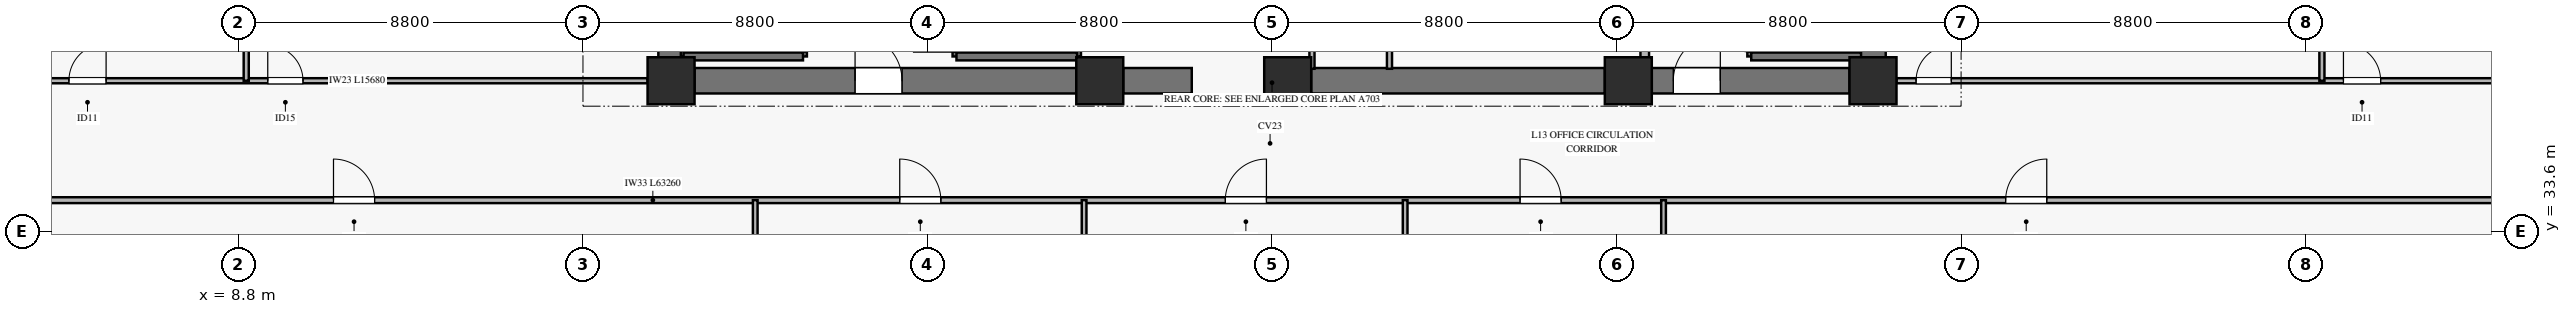
"""IFC4 building model, lengths in metres.
Left out: names, types, materials, properties, quantities, classifications, styles, units other than length and angle.
Written with IfcOpenShell. Run it as: python <this file> out.ifc"""

import sys

from ifc_helpers import new_model, si_unit, direction, frame, frame_2d, origin, origin_2d, place, context, subcontext, project, spatial, rectangle, extrude, source, transform, mapped, element, fill, save


model = new_model("IFC4")
c1 = context("Model", 3, precision=1e-05, world=origin(), true_north=direction((0.0, 1.0)))
c2 = subcontext(c1, "Body", "Model", "MODEL_VIEW")
j1 = project(units=[si_unit("LENGTHUNIT", "METRE"), si_unit("PLANEANGLEUNIT", "RADIAN")], contexts=[c1])
p1 = place(None, origin())
s1 = spatial("IfcSite", under=j1, at=p1, CompositionType="ELEMENT")
p2 = place(p1, origin())
s2 = spatial("IfcBuilding", under=s1, at=p2, CompositionType="ELEMENT")
p3 = place(p2, frame((0.0, 0.0, 53.3)))
s3 = spatial("IfcBuildingStorey", under=s2, at=p3, CompositionType="ELEMENT", Elevation=53.3)
m1 = source(origin(), c2, "Body", "SweptSolid", [
    extrude(rectangle(XDim=1.2, YDim=1.2, at=origin_2d()), origin(), (0.0, 0.0, 1.0), 3.68),
])
for number, where, z_axis, x_axis in (
    (1, (19.85, 37.45, 0.0), (0.0, 0.0, 1.0), (1.0, 0.0, 0.0)),
    (2, (30.8, 37.45, 0.0), (0.0, 0.0, 1.0), (1.0, 0.0, 0.0)),
    (3, (35.6, 37.45, 0.0), (0.0, 0.0, 1.0), (1.0, 0.0, 0.0)),
    (4, (44.3, 37.45, 0.0), (0.0, 0.0, 1.0), (1.0, 0.0, 0.0)),
    (5, (50.55, 37.45, 0.0), (0.0, 0.0, 1.0), (1.0, 0.0, 0.0)),
):
    element("IfcColumn", number, at=place(p3, frame(where, z_axis=z_axis, x_axis=x_axis)), inside=s3, PredefinedType="PILASTER", context=c2, shape_type="MappedRepresentation", body=[
        mapped(m1, transform((0.0, 0.0, 0.0), x_axis=(1.0, 0.0, 0.0), y_axis=(0.0, 1.0, 0.0), z_axis=(0.0, 0.0, 1.0), scale=1.0)),
    ])
p4 = place(p3, frame((20.45, 37.45, 0.0), z_axis=(0.0, 0.0, 1.0), x_axis=(1.0, 0.0, 0.0)))
e6 = element("IfcWall", 6, at=p4, inside=s3, PredefinedType="SHEAR", context=c2, shape_type="SweptSolid", body=[
    extrude(rectangle(XDim=9.75, YDim=0.65, at=frame_2d((4.875, 0.0))), origin(), (0.0, 0.0, 1.0), 3.68),
])
p5 = place(p4, frame((4.1, 0.0, 0.0)))
e7 = element("IfcOpeningElement", 7, at=p5, cuts=e6, PredefinedType="OPENING", context=c2, shape_type="SweptSolid", body=[
    extrude(rectangle(XDim=1.2, YDim=2.15, at=frame_2d((0.6, 1.075))), frame((0.0, 0.335, 0.0), z_axis=(0.0, -1.0, 0.0), x_axis=(1.0, 0.0, 0.0)), (0.0, 0.0, 1.0), 0.67),
])
p6 = place(p3, frame((31.4, 37.45, 0.0), z_axis=(0.0, 0.0, 1.0), x_axis=(1.0, 0.0, 0.0)))
e8 = element("IfcWall", 8, at=p6, inside=s3, PredefinedType="SHEAR", context=c2, shape_type="SweptSolid", body=[
    extrude(rectangle(XDim=1.75, YDim=0.65, at=frame_2d((0.875, 0.0))), origin(), (0.0, 0.0, 1.0), 3.68),
])
p7 = place(p3, frame((36.2, 37.45, 0.0), z_axis=(0.0, 0.0, 1.0), x_axis=(1.0, 0.0, 0.0)))
e9 = element("IfcWall", 9, at=p7, inside=s3, PredefinedType="SHEAR", context=c2, shape_type="SweptSolid", body=[
    extrude(rectangle(XDim=7.5, YDim=0.65, at=frame_2d((3.75, 0.0))), origin(), (0.0, 0.0, 1.0), 3.68),
])
p8 = place(p3, frame((44.9, 37.45, 0.0), z_axis=(0.0, 0.0, 1.0), x_axis=(1.0, 0.0, 0.0)))
e10 = element("IfcWall", 10, at=p8, inside=s3, PredefinedType="SHEAR", context=c2, shape_type="SweptSolid", body=[
    extrude(rectangle(XDim=5.05, YDim=0.65, at=frame_2d((2.525, 0.0))), origin(), (0.0, 0.0, 1.0), 3.68),
])
p9 = place(p8, frame((0.55, 0.0, 0.0)))
e11 = element("IfcOpeningElement", 11, at=p9, cuts=e10, PredefinedType="OPENING", context=c2, shape_type="SweptSolid", body=[
    extrude(rectangle(XDim=1.2, YDim=2.15, at=frame_2d((0.6, 1.075))), frame((0.0, 0.335, 0.0), z_axis=(0.0, -1.0, 0.0), x_axis=(1.0, 0.0, 0.0)), (0.0, 0.0, 1.0), 0.67),
])
for number, where, z_axis, x_axis in (
    (12, (19.85, 38.05, 0.0), (0.0, 0.0, 1.0), (0.0, 1.0, 0.0)),
    (13, (50.55, 38.05, 0.0), (0.0, 0.0, 1.0), (0.0, 1.0, 0.0)),
):
    element("IfcWall", number, at=place(p3, frame(where, z_axis=z_axis, x_axis=x_axis)), inside=s3, PredefinedType="SHEAR", context=c2, shape_type="SweptSolid", body=[
        extrude(rectangle(XDim=7.9, YDim=0.65, at=frame_2d((3.95, 0.0))), origin(), (0.0, 0.0, 1.0), 3.68),
    ])
p10 = place(p3, frame((20.17, 38.07, 0.0), z_axis=(0.0, 0.0, 1.0), x_axis=(0.0, 1.0, 0.0)))
e14 = element("IfcWall", 14, at=p10, inside=s3, PredefinedType="SOLIDWALL", context=c2, shape_type="SweptSolid", body=[
    extrude(rectangle(XDim=7.25, YDim=0.14, at=frame_2d((3.625, 0.0))), origin(), (0.0, 0.0, 1.0), 3.9),
])
p11 = place(p3, frame((23.22, 38.07, 0.0), z_axis=(0.0, 0.0, 1.0), x_axis=(0.0, 1.0, 0.0)))
e15 = element("IfcWall", 15, at=p11, inside=s3, PredefinedType="SOLIDWALL", context=c2, shape_type="SweptSolid", body=[
    extrude(rectangle(XDim=7.25, YDim=0.2, at=frame_2d((3.625, 0.0))), origin(), (0.0, 0.0, 1.0), 3.9),
])
p12 = place(p11, frame((0.11, 0.0, 0.0)))
e16 = element("IfcOpeningElement", 16, at=p12, cuts=e15, PredefinedType="OPENING", context=c2, shape_type="SweptSolid", body=[
    extrude(rectangle(XDim=1.1, YDim=2.15, at=frame_2d((0.55, 1.075))), frame((0.0, 0.11, 0.0), z_axis=(0.0, -1.0, 0.0), x_axis=(1.0, 0.0, 0.0)), (0.0, 0.0, 1.0), 0.22),
])
p13 = place(p3, frame((20.17, 38.07, 0.0), z_axis=(0.0, 0.0, 1.0), x_axis=(1.0, 0.0, 0.0)))
e17 = element("IfcWall", 17, at=p13, inside=s3, PredefinedType="SOLIDWALL", context=c2, shape_type="SweptSolid", body=[
    extrude(rectangle(XDim=3.05, YDim=0.2, at=frame_2d((1.525, 0.0))), origin(), (0.0, 0.0, 1.0), 3.9),
])
p14 = place(p3, frame((27.14, 38.07, 0.0), z_axis=(0.0, 0.0, 1.0), x_axis=(0.0, 1.0, 0.0)))
e18 = element("IfcWall", 18, at=p14, inside=s3, PredefinedType="SOLIDWALL", context=c2, shape_type="SweptSolid", body=[
    extrude(rectangle(XDim=7.25, YDim=0.2, at=frame_2d((3.625, 0.0))), origin(), (0.0, 0.0, 1.0), 3.9),
])
p15 = place(p14, frame((0.11, 0.0, 0.0)))
e19 = element("IfcOpeningElement", 19, at=p15, cuts=e18, PredefinedType="OPENING", context=c2, shape_type="SweptSolid", body=[
    extrude(rectangle(XDim=1.1, YDim=2.15, at=frame_2d((0.55, 1.075))), frame((0.0, 0.11, 0.0), z_axis=(0.0, -1.0, 0.0), x_axis=(1.0, 0.0, 0.0)), (0.0, 0.0, 1.0), 0.22),
])
p16 = place(p3, frame((30.22, 38.07, 0.0), z_axis=(0.0, 0.0, 1.0), x_axis=(0.0, 1.0, 0.0)))
e20 = element("IfcWall", 20, at=p16, inside=s3, PredefinedType="SOLIDWALL", context=c2, shape_type="SweptSolid", body=[
    extrude(rectangle(XDim=7.25, YDim=0.2, at=frame_2d((3.625, 0.0))), origin(), (0.0, 0.0, 1.0), 3.9),
])
p17 = place(p3, frame((27.14, 38.07, 0.0), z_axis=(0.0, 0.0, 1.0), x_axis=(1.0, 0.0, 0.0)))
e21 = element("IfcWall", 21, at=p17, inside=s3, PredefinedType="SOLIDWALL", context=c2, shape_type="SweptSolid", body=[
    extrude(rectangle(XDim=3.08, YDim=0.2, at=frame_2d((1.54, 0.0))), origin(), (0.0, 0.0, 1.0), 3.9),
])
p18 = place(p3, frame((47.44, 38.07, 0.0), z_axis=(0.0, 0.0, 1.0), x_axis=(0.0, 1.0, 0.0)))
e22 = element("IfcWall", 22, at=p18, inside=s3, PredefinedType="SOLIDWALL", context=c2, shape_type="SweptSolid", body=[
    extrude(rectangle(XDim=7.25, YDim=0.2, at=frame_2d((3.625, 0.0))), origin(), (0.0, 0.0, 1.0), 3.9),
])
p19 = place(p18, frame((0.11, 0.0, 0.0)))
e23 = element("IfcOpeningElement", 23, at=p19, cuts=e22, PredefinedType="OPENING", context=c2, shape_type="SweptSolid", body=[
    extrude(rectangle(XDim=1.1, YDim=2.15, at=frame_2d((0.55, 1.075))), frame((0.0, 0.11, 0.0), z_axis=(0.0, -1.0, 0.0), x_axis=(1.0, 0.0, 0.0)), (0.0, 0.0, 1.0), 0.22),
])
p20 = place(p3, frame((47.44, 38.07, 0.0), z_axis=(0.0, 0.0, 1.0), x_axis=(1.0, 0.0, 0.0)))
e24 = element("IfcWall", 24, at=p20, inside=s3, PredefinedType="SOLIDWALL", context=c2, shape_type="SweptSolid", body=[
    extrude(rectangle(XDim=2.805, YDim=0.2, at=frame_2d((1.403, 0.0))), origin(), (0.0, 0.0, 1.0), 3.9),
])
p21 = place(p3, frame((44.72, 37.755, 0.0), z_axis=(0.0, 0.0, 1.0), x_axis=(0.0, 1.0, 0.0)))
e25 = element("IfcWall", 25, at=p21, inside=s3, PredefinedType="SOLIDWALL", context=c2, shape_type="SweptSolid", body=[
    extrude(rectangle(XDim=7.465, YDim=0.22, at=frame_2d((3.732, 0.0))), origin(), (0.0, 0.0, 1.0), 3.68),
])
p22 = place(p3, frame((36.22, 37.755, 0.0), z_axis=(0.0, 0.0, 1.0), x_axis=(0.0, 1.0, 0.0)))
e26 = element("IfcWall", 26, at=p22, inside=s3, PredefinedType="PARTITIONING", context=c2, shape_type="SweptSolid", body=[
    extrude(rectangle(XDim=2.165, YDim=0.13, at=frame_2d((1.083, 0.0))), origin(), (0.0, 0.0, 1.0), 3.68),
])
p23 = place(p22, frame((0.855, 0.0, 0.0)))
e27 = element("IfcOpeningElement", 27, at=p23, cuts=e26, PredefinedType="OPENING", context=c2, shape_type="SweptSolid", body=[
    extrude(rectangle(XDim=0.9, YDim=2.1, at=frame_2d((0.45, 1.05))), frame((0.0, 0.075, 0.0), z_axis=(0.0, -1.0, 0.0), x_axis=(1.0, 0.0, 0.0)), (0.0, 0.0, 1.0), 0.15),
])
p24 = place(p3, frame((38.2, 37.755, 0.0), z_axis=(0.0, 0.0, 1.0), x_axis=(0.0, 1.0, 0.0)))
e28 = element("IfcWall", 28, at=p24, inside=s3, PredefinedType="PARTITIONING", context=c2, shape_type="SweptSolid", body=[
    extrude(rectangle(XDim=2.165, YDim=0.13, at=frame_2d((1.083, 0.0))), origin(), (0.0, 0.0, 1.0), 3.68),
])
p25 = place(p24, frame((0.565, 0.0, 0.0)))
e29 = element("IfcOpeningElement", 29, at=p25, cuts=e28, PredefinedType="OPENING", context=c2, shape_type="SweptSolid", body=[
    extrude(rectangle(XDim=0.9, YDim=2.1, at=frame_2d((0.45, 1.05))), frame((0.0, 0.075, 0.0), z_axis=(0.0, -1.0, 0.0), x_axis=(1.0, 0.0, 0.0)), (0.0, 0.0, 1.0), 0.15),
])
p26 = place(p3, frame((3.57, 34.4, 0.0), z_axis=(0.0, 0.0, 1.0), x_axis=(1.0, 0.0, 0.0)))
e30 = element("IfcWall", 30, at=p26, inside=s3, PredefinedType="PARTITIONING", context=c2, shape_type="SweptSolid", body=[
    extrude(rectangle(XDim=63.26, YDim=0.15, at=frame_2d((31.63, 0.0))), origin(), (0.0, 0.0, 1.0), 2.765),
])
p27 = place(p26, frame((7.658, 0.0, 0.0)))
e31 = element("IfcOpeningElement", 31, at=p27, cuts=e30, PredefinedType="OPENING", context=c2, shape_type="SweptSolid", body=[
    extrude(rectangle(XDim=1.05, YDim=2.15, at=frame_2d((0.525, 1.075))), frame((0.0, 0.085, 0.0), z_axis=(0.0, -1.0, 0.0), x_axis=(1.0, 0.0, 0.0)), (0.0, 0.0, 1.0), 0.17),
])
p28 = place(p26, frame((22.121, 0.0, 0.0)))
e32 = element("IfcOpeningElement", 32, at=p28, cuts=e30, PredefinedType="OPENING", context=c2, shape_type="SweptSolid", body=[
    extrude(rectangle(XDim=1.05, YDim=2.15, at=frame_2d((0.525, 1.075))), frame((0.0, 0.085, 0.0), z_axis=(0.0, -1.0, 0.0), x_axis=(1.0, 0.0, 0.0)), (0.0, 0.0, 1.0), 0.17),
])
p29 = place(p26, frame((30.437, 0.0, 0.0)))
e33 = element("IfcOpeningElement", 33, at=p29, cuts=e30, PredefinedType="OPENING", context=c2, shape_type="SweptSolid", body=[
    extrude(rectangle(XDim=1.05, YDim=2.15, at=frame_2d((0.525, 1.075))), frame((0.0, 0.085, 0.0), z_axis=(0.0, -1.0, 0.0), x_axis=(1.0, 0.0, 0.0)), (0.0, 0.0, 1.0), 0.17),
])
p30 = place(p26, frame((37.965, 0.0, 0.0)))
e34 = element("IfcOpeningElement", 34, at=p30, cuts=e30, PredefinedType="OPENING", context=c2, shape_type="SweptSolid", body=[
    extrude(rectangle(XDim=1.05, YDim=2.15, at=frame_2d((0.525, 1.075))), frame((0.0, 0.085, 0.0), z_axis=(0.0, -1.0, 0.0), x_axis=(1.0, 0.0, 0.0)), (0.0, 0.0, 1.0), 0.17),
])
p31 = place(p26, frame((50.368, 0.0, 0.0)))
e35 = element("IfcOpeningElement", 35, at=p31, cuts=e30, PredefinedType="OPENING", context=c2, shape_type="SweptSolid", body=[
    extrude(rectangle(XDim=1.05, YDim=2.15, at=frame_2d((0.525, 1.075))), frame((0.0, 0.085, 0.0), z_axis=(0.0, -1.0, 0.0), x_axis=(1.0, 0.0, 0.0)), (0.0, 0.0, 1.0), 0.17),
])
p32 = place(p3, frame((22.0, 4.354, 0.0), z_axis=(0.0, 0.0, 1.0), x_axis=(0.0, 1.0, 0.0)))
e36 = element("IfcWall", 36, at=p32, inside=s3, PredefinedType="PARTITIONING", context=c2, shape_type="SweptSolid", body=[
    extrude(rectangle(XDim=30.046, YDim=0.12, at=frame_2d((15.023, 0.0))), origin(), (0.0, 0.0, 1.0), 3.165),
])
p33 = place(p3, frame((30.4, 4.354, 0.0), z_axis=(0.0, 0.0, 1.0), x_axis=(0.0, 1.0, 0.0)))
e37 = element("IfcWall", 37, at=p33, inside=s3, PredefinedType="PARTITIONING", context=c2, shape_type="SweptSolid", body=[
    extrude(rectangle(XDim=30.046, YDim=0.12, at=frame_2d((15.023, 0.0))), origin(), (0.0, 0.0, 1.0), 3.215),
])
for number, where, z_axis, x_axis in (
    (38, (38.6, 4.354, 0.0), (0.0, 0.0, 1.0), (0.0, 1.0, 0.0)),
    (39, (45.2, 4.354, 0.0), (0.0, 0.0, 1.0), (0.0, 1.0, 0.0)),
):
    element("IfcWall", number, at=place(p3, frame(where, z_axis=z_axis, x_axis=x_axis)), inside=s3, PredefinedType="PARTITIONING", context=c2, shape_type="SweptSolid", body=[
        extrude(rectangle(XDim=30.046, YDim=0.12, at=frame_2d((15.023, 0.0))), origin(), (0.0, 0.0, 1.0), 3.165),
    ])
p34 = place(p3, frame((3.57, 37.45, 0.0), z_axis=(0.0, 0.0, 1.0), x_axis=(1.0, 0.0, 0.0)))
e40 = element("IfcWall", 40, at=p34, inside=s3, PredefinedType="PARTITIONING", context=c2, shape_type="SweptSolid", body=[
    extrude(rectangle(XDim=15.68, YDim=0.13, at=frame_2d((7.84, 0.0))), origin(), (0.0, 0.0, 1.0), 3.165),
])
p35 = place(p34, frame((0.9, 0.0, 0.0)))
e41 = element("IfcOpeningElement", 41, at=p35, cuts=e40, PredefinedType="OPENING", context=c2, shape_type="SweptSolid", body=[
    extrude(rectangle(XDim=0.95, YDim=2.1, at=frame_2d((0.475, 1.05))), frame((0.0, 0.075, 0.0), z_axis=(0.0, -1.0, 0.0), x_axis=(1.0, 0.0, 0.0)), (0.0, 0.0, 1.0), 0.15),
])
p36 = place(p34, frame((5.979, 0.0, 0.0)))
e42 = element("IfcOpeningElement", 42, at=p36, cuts=e40, PredefinedType="OPENING", context=c2, shape_type="SweptSolid", body=[
    extrude(rectangle(XDim=0.9, YDim=2.1, at=frame_2d((0.45, 1.05))), frame((0.0, 0.075, 0.0), z_axis=(0.0, -1.0, 0.0), x_axis=(1.0, 0.0, 0.0)), (0.0, 0.0, 1.0), 0.15),
])
p37 = place(p3, frame((8.999, 37.45, 0.0), z_axis=(0.0, 0.0, 1.0), x_axis=(0.0, 1.0, 0.0)))
e43 = element("IfcWall", 43, at=p37, inside=s3, PredefinedType="PARTITIONING", context=c2, shape_type="SweptSolid", body=[
    extrude(rectangle(XDim=8.8, YDim=0.13, at=frame_2d((4.4, 0.0))), origin(), (0.0, 0.0, 1.0), 3.68),
])
p38 = place(p3, frame((51.15, 37.45, 0.0), z_axis=(0.0, 0.0, 1.0), x_axis=(1.0, 0.0, 0.0)))
e44 = element("IfcWall", 44, at=p38, inside=s3, PredefinedType="PARTITIONING", context=c2, shape_type="SweptSolid", body=[
    extrude(rectangle(XDim=15.68, YDim=0.13, at=frame_2d((7.84, 0.0))), origin(), (0.0, 0.0, 1.0), 3.165),
])
p39 = place(p38, frame((0.5, 0.0, 0.0)))
e45 = element("IfcOpeningElement", 45, at=p39, cuts=e44, PredefinedType="OPENING", context=c2, shape_type="SweptSolid", body=[
    extrude(rectangle(XDim=0.9, YDim=2.1, at=frame_2d((0.45, 1.05))), frame((0.0, 0.075, 0.0), z_axis=(0.0, -1.0, 0.0), x_axis=(1.0, 0.0, 0.0)), (0.0, 0.0, 1.0), 0.15),
])
p40 = place(p38, frame((11.416, 0.0, 0.0)))
e46 = element("IfcOpeningElement", 46, at=p40, cuts=e44, PredefinedType="OPENING", context=c2, shape_type="SweptSolid", body=[
    extrude(rectangle(XDim=0.95, YDim=2.1, at=frame_2d((0.475, 1.05))), frame((0.0, 0.075, 0.0), z_axis=(0.0, -1.0, 0.0), x_axis=(1.0, 0.0, 0.0)), (0.0, 0.0, 1.0), 0.15),
])
p41 = place(p3, frame((62.016, 37.45, 0.0), z_axis=(0.0, 0.0, 1.0), x_axis=(0.0, 1.0, 0.0)))
e47 = element("IfcWall", 47, at=p41, inside=s3, PredefinedType="PARTITIONING", context=c2, shape_type="SweptSolid", body=[
    extrude(rectangle(XDim=8.8, YDim=0.13, at=frame_2d((4.4, 0.0))), origin(), (0.0, 0.0, 1.0), 3.68),
])
m2 = source(origin(), c2, "Body", "SweptSolid", [
    extrude(rectangle(XDim=1.2, YDim=2.15, at=frame_2d((0.6, 1.075))), frame((0.0, 0.025, 0.0), z_axis=(0.0, -1.0, 0.0), x_axis=(1.0, 0.0, 0.0)), (0.0, 0.0, 1.0), 0.05),
])
p42 = place(p5, origin())
e48 = element("IfcDoor", 48, at=p42, inside=s3, OperationType="SINGLE_SWING_LEFT", PredefinedType="DOOR", context=c2, shape_type="MappedRepresentation", body=[
    mapped(m2, transform((0.0, 0.0, 0.0), x_axis=(1.0, 0.0, 0.0), y_axis=(0.0, 1.0, 0.0), z_axis=(0.0, 0.0, 1.0), scale=1.0)),
])
fill(e7, e48)
p43 = place(p9, origin())
e49 = element("IfcDoor", 49, at=p43, inside=s3, OperationType="SINGLE_SWING_RIGHT", PredefinedType="DOOR", context=c2, shape_type="MappedRepresentation", body=[
    mapped(m2, transform((0.0, 0.0, 0.0), x_axis=(1.0, 0.0, 0.0), y_axis=(0.0, 1.0, 0.0), z_axis=(0.0, 0.0, 1.0), scale=1.0)),
])
fill(e11, e49)
m3 = source(origin(), c2, "Body", "SweptSolid", [
    extrude(rectangle(XDim=1.05, YDim=2.15, at=frame_2d((0.525, 1.075))), frame((0.0, 0.025, 0.0), z_axis=(0.0, -1.0, 0.0), x_axis=(1.0, 0.0, 0.0)), (0.0, 0.0, 1.0), 0.05),
])
p44 = place(p27, origin())
e50 = element("IfcDoor", 50, at=p44, inside=s3, OperationType="SINGLE_SWING_LEFT", PredefinedType="DOOR", context=c2, shape_type="MappedRepresentation", body=[
    mapped(m3, transform((0.0, 0.0, 0.0), x_axis=(1.0, 0.0, 0.0), y_axis=(0.0, 1.0, 0.0), z_axis=(0.0, 0.0, 1.0), scale=1.0)),
])
fill(e31, e50)
p45 = place(p28, origin())
e51 = element("IfcDoor", 51, at=p45, inside=s3, OperationType="SINGLE_SWING_LEFT", PredefinedType="DOOR", context=c2, shape_type="MappedRepresentation", body=[
    mapped(m3, transform((0.0, 0.0, 0.0), x_axis=(1.0, 0.0, 0.0), y_axis=(0.0, 1.0, 0.0), z_axis=(0.0, 0.0, 1.0), scale=1.0)),
])
fill(e32, e51)
p46 = place(p29, origin())
e52 = element("IfcDoor", 52, at=p46, inside=s3, OperationType="SINGLE_SWING_RIGHT", PredefinedType="DOOR", context=c2, shape_type="MappedRepresentation", body=[
    mapped(m3, transform((0.0, 0.0, 0.0), x_axis=(1.0, 0.0, 0.0), y_axis=(0.0, 1.0, 0.0), z_axis=(0.0, 0.0, 1.0), scale=1.0)),
])
fill(e33, e52)
p47 = place(p30, origin())
e53 = element("IfcDoor", 53, at=p47, inside=s3, OperationType="SINGLE_SWING_LEFT", PredefinedType="DOOR", context=c2, shape_type="MappedRepresentation", body=[
    mapped(m3, transform((0.0, 0.0, 0.0), x_axis=(1.0, 0.0, 0.0), y_axis=(0.0, 1.0, 0.0), z_axis=(0.0, 0.0, 1.0), scale=1.0)),
])
fill(e34, e53)
p48 = place(p31, origin())
e54 = element("IfcDoor", 54, at=p48, inside=s3, OperationType="SINGLE_SWING_RIGHT", PredefinedType="DOOR", context=c2, shape_type="MappedRepresentation", body=[
    mapped(m3, transform((0.0, 0.0, 0.0), x_axis=(1.0, 0.0, 0.0), y_axis=(0.0, 1.0, 0.0), z_axis=(0.0, 0.0, 1.0), scale=1.0)),
])
fill(e35, e54)
m4 = source(origin(), c2, "Body", "SweptSolid", [
    extrude(rectangle(XDim=0.95, YDim=2.1, at=frame_2d((0.475, 1.05))), frame((0.0, 0.025, 0.0), z_axis=(0.0, -1.0, 0.0), x_axis=(1.0, 0.0, 0.0)), (0.0, 0.0, 1.0), 0.05),
])
p49 = place(p35, origin())
e55 = element("IfcDoor", 55, at=p49, inside=s3, OperationType="SINGLE_SWING_RIGHT", PredefinedType="DOOR", context=c2, shape_type="MappedRepresentation", body=[
    mapped(m4, transform((0.0, 0.0, 0.0), x_axis=(1.0, 0.0, 0.0), y_axis=(0.0, 1.0, 0.0), z_axis=(0.0, 0.0, 1.0), scale=1.0)),
])
fill(e41, e55)
m5 = source(origin(), c2, "Body", "SweptSolid", [
    extrude(rectangle(XDim=0.9, YDim=2.1, at=frame_2d((0.45, 1.05))), frame((0.0, 0.025, 0.0), z_axis=(0.0, -1.0, 0.0), x_axis=(1.0, 0.0, 0.0)), (0.0, 0.0, 1.0), 0.05),
])
p50 = place(p36, origin())
e56 = element("IfcDoor", 56, at=p50, inside=s3, OperationType="SINGLE_SWING_LEFT", PredefinedType="DOOR", context=c2, shape_type="MappedRepresentation", body=[
    mapped(m5, transform((0.0, 0.0, 0.0), x_axis=(1.0, 0.0, 0.0), y_axis=(0.0, 1.0, 0.0), z_axis=(0.0, 0.0, 1.0), scale=1.0)),
])
fill(e42, e56)
p51 = place(p39, origin())
e57 = element("IfcDoor", 57, at=p51, inside=s3, OperationType="SINGLE_SWING_RIGHT", PredefinedType="DOOR", context=c2, shape_type="MappedRepresentation", body=[
    mapped(m5, transform((0.0, 0.0, 0.0), x_axis=(1.0, 0.0, 0.0), y_axis=(0.0, 1.0, 0.0), z_axis=(0.0, 0.0, 1.0), scale=1.0)),
])
fill(e45, e57)
p52 = place(p40, origin())
e58 = element("IfcDoor", 58, at=p52, inside=s3, OperationType="SINGLE_SWING_LEFT", PredefinedType="DOOR", context=c2, shape_type="MappedRepresentation", body=[
    mapped(m4, transform((0.0, 0.0, 0.0), x_axis=(1.0, 0.0, 0.0), y_axis=(0.0, 1.0, 0.0), z_axis=(0.0, 0.0, 1.0), scale=1.0)),
])
fill(e46, e58)
save(model, sys.argv[1])
